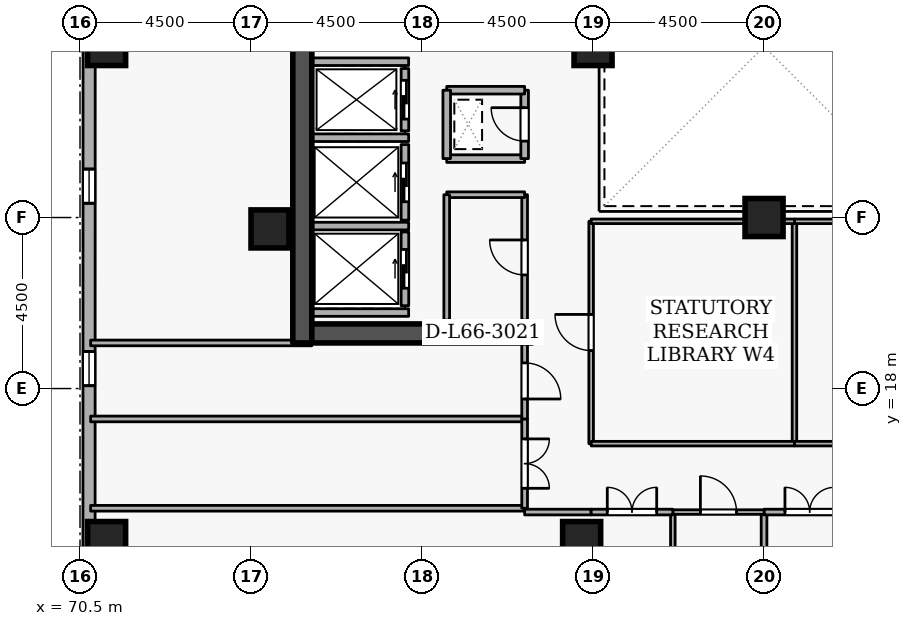
"""IFC4 building model, lengths in metres.
Left out: names, types, materials, properties, quantities, classifications, styles, units other than length and angle.
Written with IfcOpenShell. Run it as: python <this file> out.ifc"""

import sys

from ifc_helpers import new_model, si_unit, direction, frame, frame_2d, origin, origin_2d, place, context, subcontext, project, spatial, rectangle, extrude, element, fill, save


model = new_model("IFC4")
c1 = context("Model", 3, precision=1e-05, world=origin(), true_north=direction((0.0, 1.0)))
c2 = subcontext(c1, "Body", "Model", "MODEL_VIEW")
j1 = project(units=[si_unit("LENGTHUNIT", "METRE"), si_unit("PLANEANGLEUNIT", "RADIAN")], contexts=[c1])
p1 = place(None, origin())
s1 = spatial("IfcSite", under=j1, at=p1, CompositionType="ELEMENT")
p2 = place(p1, origin())
s2 = spatial("IfcBuilding", under=s1, at=p2, CompositionType="ELEMENT")
p3 = place(p2, frame((0.0, 0.0, 247.5)))
s3 = spatial("IfcBuildingStorey", under=s2, at=p3, CompositionType="ELEMENT", Elevation=247.5)
p4 = place(p3, frame((76.35, 19.2, 0.0), z_axis=(0.0, 0.0, 1.0), x_axis=(0.0, 1.0, 0.0)))
e1 = element("IfcWall", 1, at=p4, inside=s3, PredefinedType="SHEAR", context=c2, shape_type="SweptSolid", body=[
    extrude(rectangle(XDim=15.6, YDim=0.5, at=frame_2d((7.8, 0.0))), origin(), (0.0, 0.0, 1.0), 3.6),
])
p5 = place(p3, frame((76.6, 19.45, 0.0), z_axis=(0.0, 0.0, 1.0), x_axis=(1.0, 0.0, 0.0)))
e2 = element("IfcWall", 2, at=p5, inside=s3, PredefinedType="SHEAR", context=c2, shape_type="SweptSolid", body=[
    extrude(rectangle(XDim=5.8, YDim=0.5, at=frame_2d((2.9, 0.0))), origin(), (0.0, 0.0, 1.0), 3.6),
])
for number, where, z_axis, x_axis in (
    (3, (71.2, 14.0, 0.0), (0.0, 0.0, 1.0), (1.0, 0.0, 0.0)),
    (4, (71.2, 27.0, 0.0), (0.0, 0.0, 1.0), (1.0, 0.0, 0.0)),
    (5, (83.7, 14.0, 0.0), (0.0, 0.0, 1.0), (1.0, 0.0, 0.0)),
    (6, (75.5, 22.2, 0.0), (0.0, 0.0, 1.0), (1.0, 0.0, 0.0)),
    (7, (84.0, 27.0, 0.0), (0.0, 0.0, 1.0), (1.0, 0.0, 0.0)),
    (8, (88.5, 22.5, 0.0), (0.0, 0.0, 1.0), (1.0, 0.0, 0.0)),
):
    element("IfcColumn", number, at=place(p3, frame(where, z_axis=z_axis, x_axis=x_axis)), inside=s3, PredefinedType="COLUMN", context=c2, shape_type="SweptSolid", body=[
        extrude(rectangle(XDim=1.0, YDim=1.0, at=origin_2d()), origin(), (0.0, 0.0, 1.0), 3.6),
    ])
p6 = place(p3, frame((70.743, 39.975, 0.0), z_axis=(0.0, 0.0, 1.0), x_axis=(-0.000214431216, -0.99999997701, 0.0)))
e9 = element("IfcWall", 9, at=p6, inside=s3, PredefinedType="STANDARD", context=c2, shape_type="SweptSolid", body=[
    extrude(rectangle(XDim=34.156, YDim=0.32, at=frame_2d((17.078, 0.0))), origin(), (0.0, 0.0, 1.0), 2.7),
])
p7 = place(p6, frame((6.6, 0.0, 0.72)))
e10 = element("IfcOpeningElement", 10, at=p7, cuts=e9, PredefinedType="OPENING", context=c2, shape_type="SweptSolid", body=[
    extrude(rectangle(XDim=0.9, YDim=1.75, at=frame_2d((0.45, 0.875))), frame((0.0, 0.17, 0.0), z_axis=(0.0, -1.0, 0.0), x_axis=(1.0, 0.0, 0.0)), (0.0, 0.0, 1.0), 0.34),
])
p8 = place(p6, frame((16.2, 0.0, 0.72)))
e11 = element("IfcOpeningElement", 11, at=p8, cuts=e9, PredefinedType="OPENING", context=c2, shape_type="SweptSolid", body=[
    extrude(rectangle(XDim=0.9, YDim=1.75, at=frame_2d((0.45, 0.875))), frame((0.0, 0.17, 0.0), z_axis=(0.0, -1.0, 0.0), x_axis=(1.0, 0.0, 0.0)), (0.0, 0.0, 1.0), 0.34),
])
p9 = place(p6, frame((21.0, 0.0, 0.72)))
e12 = element("IfcOpeningElement", 12, at=p9, cuts=e9, PredefinedType="OPENING", context=c2, shape_type="SweptSolid", body=[
    extrude(rectangle(XDim=0.9, YDim=1.75, at=frame_2d((0.45, 0.875))), frame((0.0, 0.17, 0.0), z_axis=(0.0, -1.0, 0.0), x_axis=(1.0, 0.0, 0.0)), (0.0, 0.0, 1.0), 0.34),
])
p10 = place(p6, frame((30.6, 0.0, 0.72)))
e13 = element("IfcOpeningElement", 13, at=p10, cuts=e9, PredefinedType="OPENING", context=c2, shape_type="SweptSolid", body=[
    extrude(rectangle(XDim=0.9, YDim=1.75, at=frame_2d((0.45, 0.875))), frame((0.0, 0.17, 0.0), z_axis=(0.0, -1.0, 0.0), x_axis=(1.0, 0.0, 0.0)), (0.0, 0.0, 1.0), 0.34),
])
p11 = place(p3, frame((79.05, 24.78, 0.0), z_axis=(0.0, 0.0, 1.0), x_axis=(0.0, 1.0, 0.0)))
e14 = element("IfcWall", 14, at=p11, inside=s3, PredefinedType="STANDARD", context=c2, shape_type="SweptSolid", body=[
    extrude(rectangle(XDim=1.64, YDim=0.2, at=frame_2d((0.82, 0.0))), origin(), (0.0, 0.0, 1.0), 3.34),
])
p12 = place(p11, frame((0.31, 0.0, 0.0)))
e15 = element("IfcOpeningElement", 15, at=p12, cuts=e14, PredefinedType="OPENING", context=c2, shape_type="SweptSolid", body=[
    extrude(rectangle(XDim=1.02, YDim=2.06, at=frame_2d((0.51, 1.03))), frame((0.0, 0.11, 0.0), z_axis=(0.0, -1.0, 0.0), x_axis=(1.0, 0.0, 0.0)), (0.0, 0.0, 1.0), 0.22),
])
p13 = place(p3, frame((79.05, 22.43, 0.0), z_axis=(0.0, 0.0, 1.0), x_axis=(0.0, 1.0, 0.0)))
e16 = element("IfcWall", 16, at=p13, inside=s3, PredefinedType="STANDARD", context=c2, shape_type="SweptSolid", body=[
    extrude(rectangle(XDim=1.99, YDim=0.2, at=frame_2d((0.995, 0.0))), origin(), (0.0, 0.0, 1.0), 3.34),
])
p14 = place(p13, frame((0.485, 0.0, 0.0)))
e17 = element("IfcOpeningElement", 17, at=p14, cuts=e16, PredefinedType="OPENING", context=c2, shape_type="SweptSolid", body=[
    extrude(rectangle(XDim=1.02, YDim=2.06, at=frame_2d((0.51, 1.03))), frame((0.0, 0.11, 0.0), z_axis=(0.0, -1.0, 0.0), x_axis=(1.0, 0.0, 0.0)), (0.0, 0.0, 1.0), 0.22),
])
p15 = place(p3, frame((79.05, 20.18, 0.0), z_axis=(0.0, 0.0, 1.0), x_axis=(0.0, 1.0, 0.0)))
e18 = element("IfcWall", 18, at=p15, inside=s3, PredefinedType="STANDARD", context=c2, shape_type="SweptSolid", body=[
    extrude(rectangle(XDim=1.94, YDim=0.2, at=frame_2d((0.97, 0.0))), origin(), (0.0, 0.0, 1.0), 3.34),
])
p16 = place(p15, frame((0.46, 0.0, 0.0)))
e19 = element("IfcOpeningElement", 19, at=p16, cuts=e18, PredefinedType="OPENING", context=c2, shape_type="SweptSolid", body=[
    extrude(rectangle(XDim=1.02, YDim=2.06, at=frame_2d((0.51, 1.03))), frame((0.0, 0.11, 0.0), z_axis=(0.0, -1.0, 0.0), x_axis=(1.0, 0.0, 0.0)), (0.0, 0.0, 1.0), 0.22),
])
for number, where, z_axis, x_axis in (
    (20, (76.612, 26.6, 0.0), (0.0, 0.0, 1.0), (1.0, 0.0, 0.0)),
    (21, (76.612, 24.6, 0.0), (0.0, 0.0, 1.0), (1.0, 0.0, 0.0)),
    (22, (76.612, 22.275, 0.0), (0.0, 0.0, 1.0), (1.0, 0.0, 0.0)),
    (23, (76.612, 20.0, 0.0), (0.0, 0.0, 1.0), (1.0, 0.0, 0.0)),
):
    element("IfcWall", number, at=place(p3, frame(where, z_axis=z_axis, x_axis=x_axis)), inside=s3, PredefinedType="STANDARD", context=c2, shape_type="SweptSolid", body=[
        extrude(rectangle(XDim=2.536, YDim=0.2, at=frame_2d((1.268, 0.0))), origin(), (0.0, 0.0, 1.0), 3.34),
    ])
p17 = place(p3, frame((80.15, 24.05, 0.0), z_axis=(0.0, 0.0, 1.0), x_axis=(1.0, 0.0, 0.0)))
e24 = element("IfcWall", 24, at=p17, inside=s3, PredefinedType="STANDARD", context=c2, shape_type="SweptSolid", body=[
    extrude(rectangle(XDim=2.05, YDim=0.2, at=frame_2d((1.025, 0.0))), origin(), (0.0, 0.0, 1.0), 3.34),
])
p18 = place(p3, frame((82.2, 24.05, 0.0), z_axis=(0.0, 0.0, 1.0), x_axis=(0.0, 1.0, 0.0)))
e25 = element("IfcWall", 25, at=p18, inside=s3, PredefinedType="STANDARD", context=c2, shape_type="SweptSolid", body=[
    extrude(rectangle(XDim=1.8, YDim=0.2, at=frame_2d((0.9, 0.0))), origin(), (0.0, 0.0, 1.0), 3.34),
])
p19 = place(p18, frame((0.46, 0.0, 0.0)))
e26 = element("IfcOpeningElement", 26, at=p19, cuts=e25, PredefinedType="OPENING", context=c2, shape_type="SweptSolid", body=[
    extrude(rectangle(XDim=0.88, YDim=2.04, at=frame_2d((0.44, 1.02))), frame((0.0, 0.11, 0.0), z_axis=(0.0, -1.0, 0.0), x_axis=(1.0, 0.0, 0.0)), (0.0, 0.0, 1.0), 0.22),
])
p20 = place(p3, frame((82.2, 25.85, 0.0), z_axis=(0.0, 0.0, 1.0), x_axis=(-1.0, 0.0, 0.0)))
e27 = element("IfcWall", 27, at=p20, inside=s3, PredefinedType="STANDARD", context=c2, shape_type="SweptSolid", body=[
    extrude(rectangle(XDim=2.05, YDim=0.2, at=frame_2d((1.025, 0.0))), origin(), (0.0, 0.0, 1.0), 3.34),
])
p21 = place(p3, frame((80.15, 25.85, 0.0), z_axis=(0.0, 0.0, 1.0), x_axis=(0.0, -1.0, 0.0)))
e28 = element("IfcWall", 28, at=p21, inside=s3, PredefinedType="STANDARD", context=c2, shape_type="SweptSolid", body=[
    extrude(rectangle(XDim=1.8, YDim=0.2, at=frame_2d((0.9, 0.0))), origin(), (0.0, 0.0, 1.0), 3.34),
])
p22 = place(p3, frame((82.2, 19.8, 0.0), z_axis=(0.0, 0.0, 1.0), x_axis=(0.0, 1.0, 0.0)))
e29 = element("IfcWall", 29, at=p22, inside=s3, PredefinedType="PARTITIONING", context=c2, shape_type="SweptSolid", body=[
    extrude(rectangle(XDim=3.3, YDim=0.15, at=frame_2d((1.65, 0.0))), origin(), (0.0, 0.0, 1.0), 3.34),
])
p23 = place(p22, frame((1.19, 0.0, 0.0)))
e30 = element("IfcOpeningElement", 30, at=p23, cuts=e29, PredefinedType="OPENING", context=c2, shape_type="SweptSolid", body=[
    extrude(rectangle(XDim=0.92, YDim=2.08, at=frame_2d((0.46, 1.04))), frame((0.0, 0.085, 0.0), z_axis=(0.0, -1.0, 0.0), x_axis=(1.0, 0.0, 0.0)), (0.0, 0.0, 1.0), 0.17),
])
p24 = place(p3, frame((82.2, 23.1, 0.0), z_axis=(0.0, 0.0, 1.0), x_axis=(-1.0, 0.0, 0.0)))
e31 = element("IfcWall", 31, at=p24, inside=s3, PredefinedType="PARTITIONING", context=c2, shape_type="SweptSolid", body=[
    extrude(rectangle(XDim=2.05, YDim=0.15, at=frame_2d((1.025, 0.0))), origin(), (0.0, 0.0, 1.0), 3.34),
])
p25 = place(p3, frame((80.15, 23.1, 0.0), z_axis=(0.0, 0.0, 1.0), x_axis=(0.0, -1.0, 0.0)))
e32 = element("IfcWall", 32, at=p25, inside=s3, PredefinedType="PARTITIONING", context=c2, shape_type="SweptSolid", body=[
    extrude(rectangle(XDim=3.3, YDim=0.15, at=frame_2d((1.65, 0.0))), origin(), (0.0, 0.0, 1.0), 3.34),
])
for number, where, z_axis, x_axis in (
    (33, (82.2, 14.85, 0.0), (0.0, 0.0, 1.0), (-1.0, 0.0, 0.0)),
    (34, (70.78, 17.2, 0.0), (0.0, 0.0, 1.0), (1.0, 0.0, 0.0)),
):
    element("IfcWall", number, at=place(p3, frame(where, z_axis=z_axis, x_axis=x_axis)), inside=s3, PredefinedType="PARTITIONING", context=c2, shape_type="SweptSolid", body=[
        extrude(rectangle(XDim=11.42, YDim=0.15, at=frame_2d((5.71, 0.0))), origin(), (0.0, 0.0, 1.0), 3.34),
    ])
p26 = place(p3, frame((82.2, 17.2, 0.0), z_axis=(0.0, 0.0, 1.0), x_axis=(0.0, -1.0, 0.0)))
e35 = element("IfcWall", 35, at=p26, inside=s3, PredefinedType="PARTITIONING", context=c2, shape_type="SweptSolid", body=[
    extrude(rectangle(XDim=2.35, YDim=0.15, at=frame_2d((1.175, 0.0))), origin(), (0.0, 0.0, 1.0), 3.34),
])
p27 = place(p26, frame((0.525, 0.0, 0.0)))
e36 = element("IfcOpeningElement", 36, at=p27, cuts=e35, PredefinedType="OPENING", context=c2, shape_type="SweptSolid", body=[
    extrude(rectangle(XDim=1.3, YDim=2.12, at=frame_2d((0.65, 1.06))), frame((0.0, 0.085, 0.0), z_axis=(0.0, -1.0, 0.0), x_axis=(1.0, 0.0, 0.0)), (0.0, 0.0, 1.0), 0.17),
])
p28 = place(p3, frame((70.78, 19.2, 0.0), z_axis=(0.0, 0.0, 1.0), x_axis=(1.0, 0.0, 0.0)))
e37 = element("IfcWall", 37, at=p28, inside=s3, PredefinedType="PARTITIONING", context=c2, shape_type="SweptSolid", body=[
    extrude(rectangle(XDim=5.82, YDim=0.15, at=frame_2d((2.91, 0.0))), origin(), (0.0, 0.0, 1.0), 2.545),
])
p29 = place(p3, frame((82.2, 19.2, 0.0), z_axis=(0.0, 0.0, 1.0), x_axis=(0.0, -1.0, 0.0)))
e38 = element("IfcWall", 38, at=p29, inside=s3, PredefinedType="PARTITIONING", context=c2, shape_type="SweptSolid", body=[
    extrude(rectangle(XDim=2.0, YDim=0.15, at=frame_2d((1.0, 0.0))), origin(), (0.0, 0.0, 1.0), 3.34),
])
p30 = place(p29, frame((0.525, 0.0, 0.0)))
e39 = element("IfcOpeningElement", 39, at=p30, cuts=e38, PredefinedType="OPENING", context=c2, shape_type="SweptSolid", body=[
    extrude(rectangle(XDim=0.95, YDim=2.1, at=frame_2d((0.475, 1.05))), frame((0.0, 0.085, 0.0), z_axis=(0.0, -1.0, 0.0), x_axis=(1.0, 0.0, 0.0)), (0.0, 0.0, 1.0), 0.17),
])
p31 = place(p3, frame((88.5, 3.28, 0.0), z_axis=(0.0, 0.0, 1.0), x_axis=(0.0, 1.0, 0.0)))
e40 = element("IfcWall", 40, at=p31, inside=s3, PredefinedType="PARTITIONING", context=c2, shape_type="SweptSolid", body=[
    extrude(rectangle(XDim=11.47, YDim=0.15, at=frame_2d((5.735, 0.0))), origin(), (0.0, 0.0, 1.0), 2.882),
])
p32 = place(p3, frame((88.5, 14.75, 0.0), z_axis=(0.0, 0.0, 1.0), x_axis=(1.0, 0.0, 0.0)))
e41 = element("IfcWall", 41, at=p32, inside=s3, PredefinedType="PARTITIONING", context=c2, shape_type="SweptSolid", body=[
    extrude(rectangle(XDim=2.4, YDim=0.15, at=frame_2d((1.2, 0.0))), origin(), (0.0, 0.0, 1.0), 3.34),
])
p33 = place(p32, frame((0.55, 0.0, 0.0)))
e42 = element("IfcOpeningElement", 42, at=p33, cuts=e41, PredefinedType="OPENING", context=c2, shape_type="SweptSolid", body=[
    extrude(rectangle(XDim=1.3, YDim=2.12, at=frame_2d((0.65, 1.06))), frame((0.0, 0.085, 0.0), z_axis=(0.0, -1.0, 0.0), x_axis=(1.0, 0.0, 0.0)), (0.0, 0.0, 1.0), 0.17),
])
p34 = place(p3, frame((86.1, 3.28, 0.0), z_axis=(0.0, 0.0, 1.0), x_axis=(0.0, 1.0, 0.0)))
e43 = element("IfcWall", 43, at=p34, inside=s3, PredefinedType="PARTITIONING", context=c2, shape_type="SweptSolid", body=[
    extrude(rectangle(XDim=11.47, YDim=0.12, at=frame_2d((5.735, 0.0))), origin(), (0.0, 0.0, 1.0), 3.34),
])
p35 = place(p3, frame((86.1, 14.75, 0.0), z_axis=(0.0, 0.0, 1.0), x_axis=(1.0, 0.0, 0.0)))
e44 = element("IfcWall", 44, at=p35, inside=s3, PredefinedType="PARTITIONING", context=c2, shape_type="SweptSolid", body=[
    extrude(rectangle(XDim=2.4, YDim=0.12, at=frame_2d((1.2, 0.0))), origin(), (0.0, 0.0, 1.0), 3.34),
])
p36 = place(p35, frame((0.725, 0.0, 0.0)))
e45 = element("IfcOpeningElement", 45, at=p36, cuts=e44, PredefinedType="OPENING", context=c2, shape_type="SweptSolid", body=[
    extrude(rectangle(XDim=0.95, YDim=2.1, at=frame_2d((0.475, 1.05))), frame((0.0, 0.07, 0.0), z_axis=(0.0, -1.0, 0.0), x_axis=(1.0, 0.0, 0.0)), (0.0, 0.0, 1.0), 0.14),
])
p37 = place(p3, frame((82.2, 14.75, 0.0), z_axis=(0.0, 0.0, 1.0), x_axis=(1.0, 0.0, 0.0)))
e46 = element("IfcWall", 46, at=p37, inside=s3, PredefinedType="PARTITIONING", context=c2, shape_type="SweptSolid", body=[
    extrude(rectangle(XDim=1.75, YDim=0.15, at=frame_2d((0.875, 0.0))), origin(), (0.0, 0.0, 1.0), 3.34),
])
p38 = place(p3, frame((83.95, 14.75, 0.0), z_axis=(0.0, 0.0, 1.0), x_axis=(1.0, 0.0, 0.0)))
e47 = element("IfcWall", 47, at=p38, inside=s3, PredefinedType="PARTITIONING", context=c2, shape_type="SweptSolid", body=[
    extrude(rectangle(XDim=2.15, YDim=0.15, at=frame_2d((1.075, 0.0))), origin(), (0.0, 0.0, 1.0), 3.34),
])
p39 = place(p38, frame((0.425, 0.0, 0.0)))
e48 = element("IfcOpeningElement", 48, at=p39, cuts=e47, PredefinedType="OPENING", context=c2, shape_type="SweptSolid", body=[
    extrude(rectangle(XDim=1.3, YDim=2.12, at=frame_2d((0.65, 1.06))), frame((0.0, 0.085, 0.0), z_axis=(0.0, -1.0, 0.0), x_axis=(1.0, 0.0, 0.0)), (0.0, 0.0, 1.0), 0.17),
])
p40 = place(p3, frame((89.3, 16.55, 0.0), z_axis=(0.0, 0.0, 1.0), x_axis=(0.0, 1.0, 0.0)))
e49 = element("IfcWall", 49, at=p40, inside=s3, PredefinedType="PARTITIONING", context=c2, shape_type="SweptSolid", body=[
    extrude(rectangle(XDim=5.85, YDim=0.12, at=frame_2d((2.925, 0.0))), origin(), (0.0, 0.0, 1.0), 3.34),
])
for number, where, z_axis, x_axis in (
    (50, (89.3, 22.4, 0.0), (0.0, 0.0, 1.0), (1.0, 0.0, 0.0)),
    (51, (93.05, 16.55, 0.0), (0.0, 0.0, 1.0), (-1.0, 0.0, 0.0)),
):
    element("IfcWall", number, at=place(p3, frame(where, z_axis=z_axis, x_axis=x_axis)), inside=s3, PredefinedType="PARTITIONING", context=c2, shape_type="SweptSolid", body=[
        extrude(rectangle(XDim=3.75, YDim=0.12, at=frame_2d((1.875, 0.0))), origin(), (0.0, 0.0, 1.0), 3.34),
    ])
p41 = place(p3, frame((83.95, 16.55, 0.0), z_axis=(0.0, 0.0, 1.0), x_axis=(0.0, 1.0, 0.0)))
e52 = element("IfcWall", 52, at=p41, inside=s3, PredefinedType="PARTITIONING", context=c2, shape_type="SweptSolid", body=[
    extrude(rectangle(XDim=5.85, YDim=0.12, at=frame_2d((2.925, 0.0))), origin(), (0.0, 0.0, 1.0), 3.34),
])
p42 = place(p41, frame((2.45, 0.0, 0.0)))
e53 = element("IfcOpeningElement", 53, at=p42, cuts=e52, PredefinedType="OPENING", context=c2, shape_type="SweptSolid", body=[
    extrude(rectangle(XDim=0.95, YDim=2.1, at=frame_2d((0.475, 1.05))), frame((0.0, 0.07, 0.0), z_axis=(0.0, -1.0, 0.0), x_axis=(1.0, 0.0, 0.0)), (0.0, 0.0, 1.0), 0.14),
])
for number, where, z_axis, x_axis in (
    (54, (83.95, 22.4, 0.0), (0.0, 0.0, 1.0), (1.0, 0.0, 0.0)),
    (55, (89.3, 16.55, 0.0), (0.0, 0.0, 1.0), (-1.0, 0.0, 0.0)),
):
    element("IfcWall", number, at=place(p3, frame(where, z_axis=z_axis, x_axis=x_axis)), inside=s3, PredefinedType="PARTITIONING", context=c2, shape_type="SweptSolid", body=[
        extrude(rectangle(XDim=5.35, YDim=0.12, at=frame_2d((2.675, 0.0))), origin(), (0.0, 0.0, 1.0), 3.34),
    ])
p43 = place(p8, origin())
e56 = element("IfcWindow", 56, at=p43, inside=s3, PartitioningType="SINGLE_PANEL", PredefinedType="WINDOW", context=c2, shape_type="SweptSolid", body=[
    extrude(rectangle(XDim=0.9, YDim=1.75, at=frame_2d((0.45, 0.875))), frame((0.0, 0.03, 0.0), z_axis=(0.0, -1.0, 0.0), x_axis=(1.0, 0.0, 0.0)), (0.0, 0.0, 1.0), 0.06),
])
fill(e11, e56)
p44 = place(p9, origin())
e57 = element("IfcWindow", 57, at=p44, inside=s3, PartitioningType="SINGLE_PANEL", PredefinedType="WINDOW", context=c2, shape_type="SweptSolid", body=[
    extrude(rectangle(XDim=0.9, YDim=1.75, at=frame_2d((0.45, 0.875))), frame((0.0, 0.03, 0.0), z_axis=(0.0, -1.0, 0.0), x_axis=(1.0, 0.0, 0.0)), (0.0, 0.0, 1.0), 0.06),
])
fill(e12, e57)
p45 = place(p12, origin())
e58 = element("IfcDoor", 58, at=p45, inside=s3, OperationType="SLIDING_TO_LEFT", PredefinedType="DOOR", context=c2, shape_type="SweptSolid", body=[
    extrude(rectangle(XDim=1.02, YDim=2.06, at=frame_2d((0.51, 1.03))), frame((0.0, 0.025, 0.0), z_axis=(0.0, -1.0, 0.0), x_axis=(1.0, 0.0, 0.0)), (0.0, 0.0, 1.0), 0.05),
])
fill(e15, e58)
p46 = place(p14, origin())
e59 = element("IfcDoor", 59, at=p46, inside=s3, OperationType="SLIDING_TO_LEFT", PredefinedType="DOOR", context=c2, shape_type="SweptSolid", body=[
    extrude(rectangle(XDim=1.02, YDim=2.06, at=frame_2d((0.51, 1.03))), frame((0.0, 0.025, 0.0), z_axis=(0.0, -1.0, 0.0), x_axis=(1.0, 0.0, 0.0)), (0.0, 0.0, 1.0), 0.05),
])
fill(e17, e59)
p47 = place(p16, origin())
e60 = element("IfcDoor", 60, at=p47, inside=s3, OperationType="SLIDING_TO_LEFT", PredefinedType="DOOR", context=c2, shape_type="SweptSolid", body=[
    extrude(rectangle(XDim=1.02, YDim=2.06, at=frame_2d((0.51, 1.03))), frame((0.0, 0.025, 0.0), z_axis=(0.0, -1.0, 0.0), x_axis=(1.0, 0.0, 0.0)), (0.0, 0.0, 1.0), 0.05),
])
fill(e19, e60)
p48 = place(p19, origin())
e61 = element("IfcDoor", 61, at=p48, inside=s3, OperationType="SINGLE_SWING_RIGHT", PredefinedType="DOOR", context=c2, shape_type="SweptSolid", body=[
    extrude(rectangle(XDim=0.88, YDim=2.04, at=frame_2d((0.44, 1.02))), frame((0.0, 0.025, 0.0), z_axis=(0.0, -1.0, 0.0), x_axis=(1.0, 0.0, 0.0)), (0.0, 0.0, 1.0), 0.05),
])
fill(e26, e61)
p49 = place(p23, origin())
e62 = element("IfcDoor", 62, at=p49, inside=s3, OperationType="SINGLE_SWING_RIGHT", PredefinedType="DOOR", context=c2, shape_type="SweptSolid", body=[
    extrude(rectangle(XDim=0.92, YDim=2.08, at=frame_2d((0.46, 1.04))), frame((0.0, 0.025, 0.0), z_axis=(0.0, -1.0, 0.0), x_axis=(1.0, 0.0, 0.0)), (0.0, 0.0, 1.0), 0.05),
])
fill(e30, e62)
p50 = place(p27, origin())
e63 = element("IfcDoor", 63, at=p50, inside=s3, OperationType="DOUBLE_DOOR_SINGLE_SWING", PredefinedType="DOOR", context=c2, shape_type="SweptSolid", body=[
    extrude(rectangle(XDim=1.3, YDim=2.12, at=frame_2d((0.65, 1.06))), frame((0.0, 0.025, 0.0), z_axis=(0.0, -1.0, 0.0), x_axis=(1.0, 0.0, 0.0)), (0.0, 0.0, 1.0), 0.05),
])
fill(e36, e63)
p51 = place(p30, origin())
e64 = element("IfcDoor", 64, at=p51, inside=s3, OperationType="SINGLE_SWING_RIGHT", PredefinedType="DOOR", context=c2, shape_type="SweptSolid", body=[
    extrude(rectangle(XDim=0.95, YDim=2.1, at=frame_2d((0.475, 1.05))), frame((0.0, 0.025, 0.0), z_axis=(0.0, -1.0, 0.0), x_axis=(1.0, 0.0, 0.0)), (0.0, 0.0, 1.0), 0.05),
])
fill(e39, e64)
p52 = place(p33, origin())
e65 = element("IfcDoor", 65, at=p52, inside=s3, OperationType="DOUBLE_DOOR_SINGLE_SWING", PredefinedType="DOOR", context=c2, shape_type="SweptSolid", body=[
    extrude(rectangle(XDim=1.3, YDim=2.12, at=frame_2d((0.65, 1.06))), frame((0.0, 0.025, 0.0), z_axis=(0.0, -1.0, 0.0), x_axis=(1.0, 0.0, 0.0)), (0.0, 0.0, 1.0), 0.05),
])
fill(e42, e65)
p53 = place(p36, origin())
e66 = element("IfcDoor", 66, at=p53, inside=s3, OperationType="SINGLE_SWING_LEFT", PredefinedType="DOOR", context=c2, shape_type="SweptSolid", body=[
    extrude(rectangle(XDim=0.95, YDim=2.1, at=frame_2d((0.475, 1.05))), frame((0.0, 0.025, 0.0), z_axis=(0.0, -1.0, 0.0), x_axis=(1.0, 0.0, 0.0)), (0.0, 0.0, 1.0), 0.05),
])
fill(e45, e66)
p54 = place(p39, origin())
e67 = element("IfcDoor", 67, at=p54, inside=s3, OperationType="DOUBLE_DOOR_SINGLE_SWING", PredefinedType="DOOR", context=c2, shape_type="SweptSolid", body=[
    extrude(rectangle(XDim=1.3, YDim=2.12, at=frame_2d((0.65, 1.06))), frame((0.0, 0.025, 0.0), z_axis=(0.0, -1.0, 0.0), x_axis=(1.0, 0.0, 0.0)), (0.0, 0.0, 1.0), 0.05),
])
fill(e48, e67)
p55 = place(p42, origin())
e68 = element("IfcDoor", 68, at=p55, inside=s3, OperationType="SINGLE_SWING_RIGHT", PredefinedType="DOOR", context=c2, shape_type="SweptSolid", body=[
    extrude(rectangle(XDim=0.95, YDim=2.1, at=frame_2d((0.475, 1.05))), frame((0.0, 0.025, 0.0), z_axis=(0.0, -1.0, 0.0), x_axis=(1.0, 0.0, 0.0)), (0.0, 0.0, 1.0), 0.05),
])
fill(e53, e68)
save(model, sys.argv[1])
